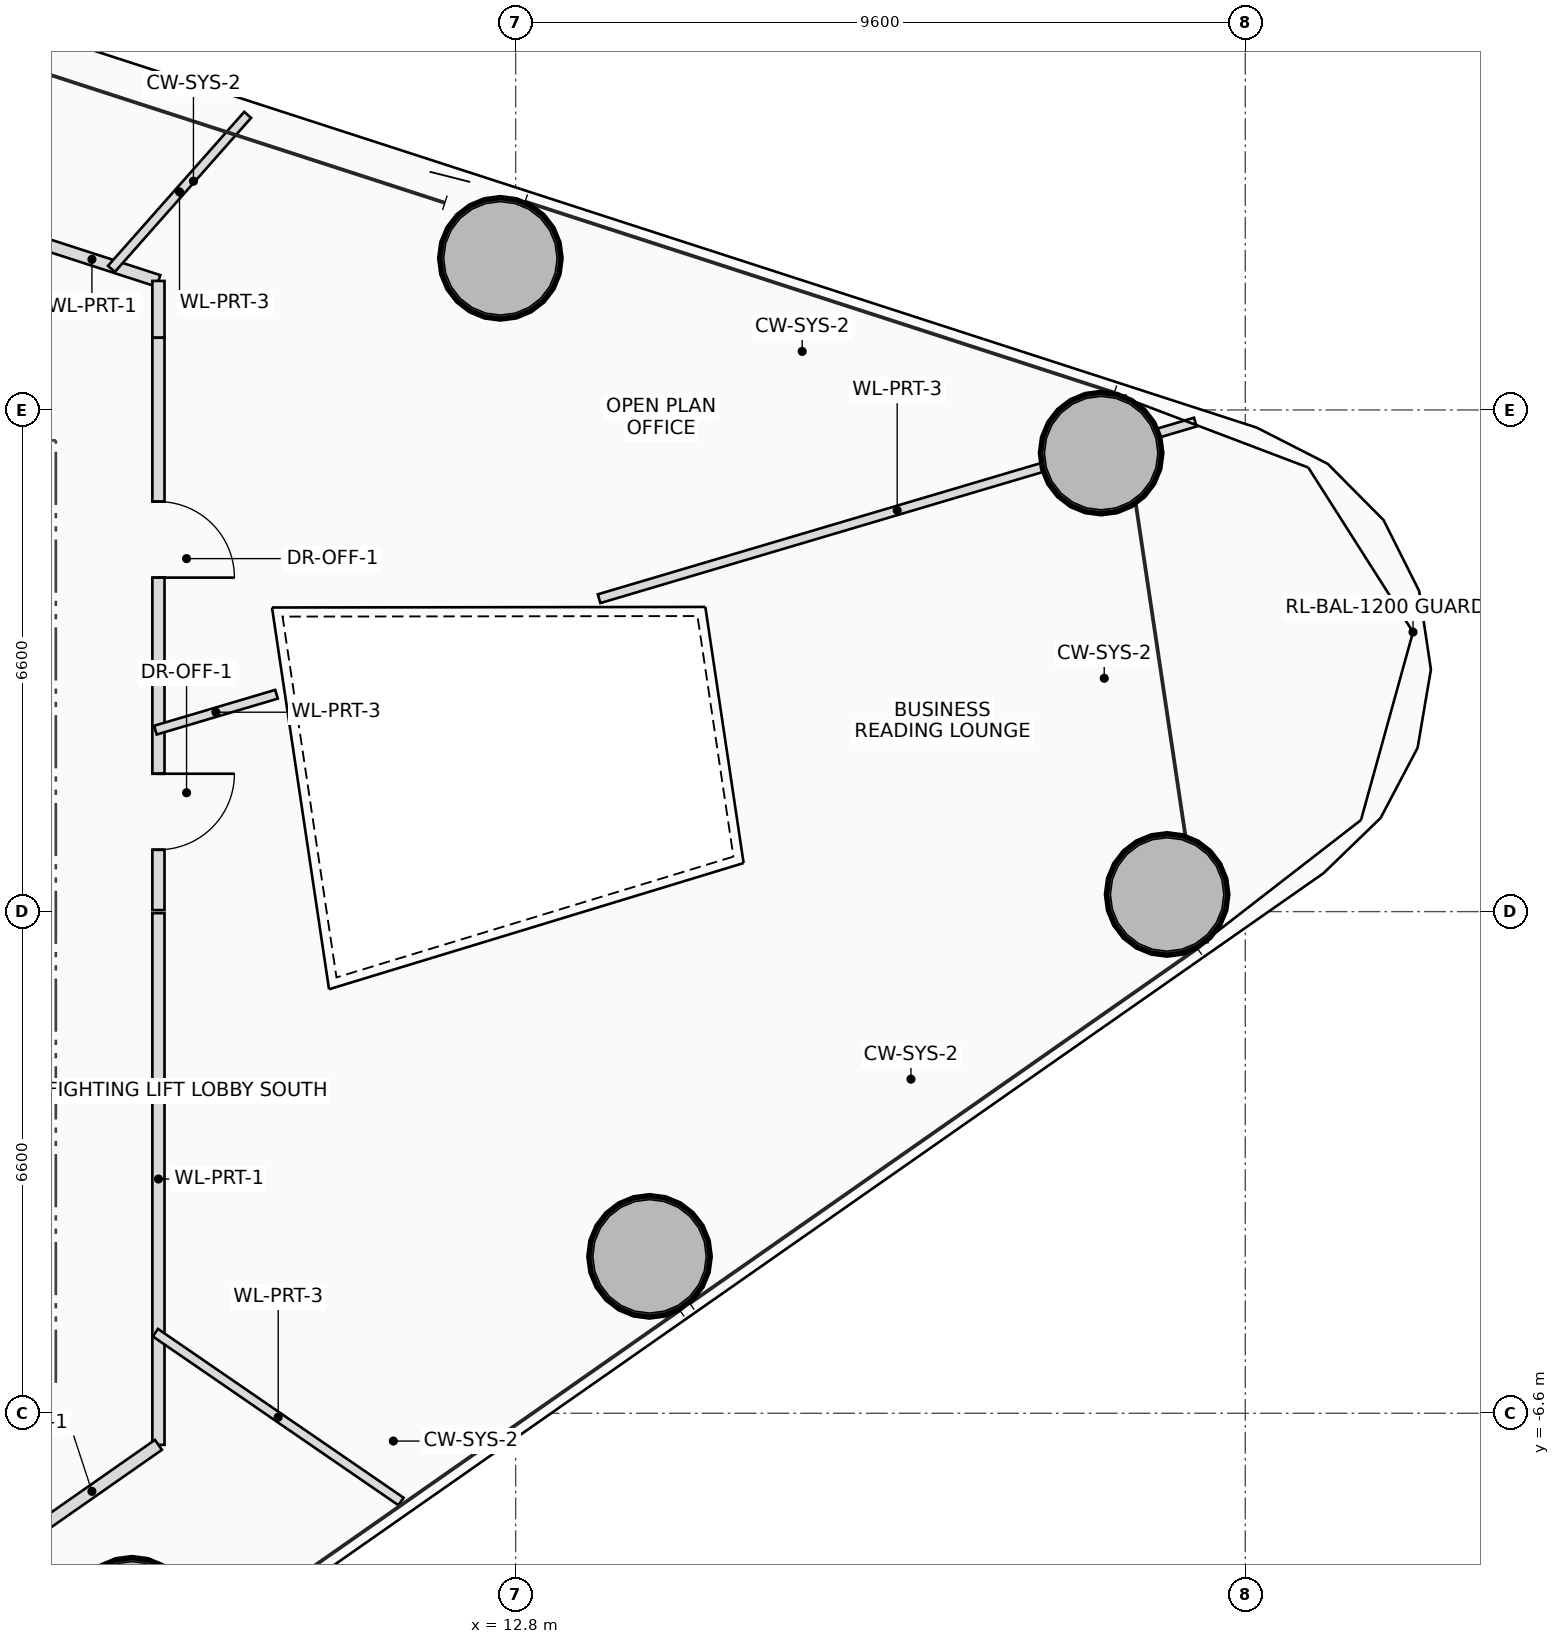
"""IFC4 building model, lengths in metres.
Left out: names, types, materials, properties, quantities, classifications, styles, units other than length and angle.
Written with IfcOpenShell. Run it as: python <this file> out.ifc"""

import sys

from ifc_helpers import new_model, si_unit, direction, frame, frame_2d, origin, origin_2d, place, context, subcontext, project, spatial, rectangle, hollow_circle, extrude, source, transform, mapped, element, fill, save


model = new_model("IFC4")
c1 = context("Model", 3, precision=1e-05, world=origin(), true_north=direction((0.0, 1.0)))
c2 = subcontext(c1, "Body", "Model", "MODEL_VIEW")
j1 = project(units=[si_unit("LENGTHUNIT", "METRE"), si_unit("PLANEANGLEUNIT", "RADIAN")], contexts=[c1])
p1 = place(None, origin())
s1 = spatial("IfcSite", under=j1, at=p1, CompositionType="ELEMENT")
p2 = place(p1, origin())
s2 = spatial("IfcBuilding", under=s1, at=p2, CompositionType="ELEMENT")
p3 = place(p2, frame((0.0, 0.0, 73.55)))
s3 = spatial("IfcBuildingStorey", under=s2, at=p3, CompositionType="ELEMENT", Elevation=73.55)
m1 = source(origin(), c2, "Body", "SweptSolid", [
    extrude(hollow_circle(Radius=0.8, WallThickness=0.055, at=origin_2d()), origin(), (0.0, 0.0, 1.0), 3.75),
])
for number, where, z_axis, x_axis in (
    (1, (7.752, -9.297, 0.0), (0.0, 0.0, 1.0), (1.0, 0.0, 0.0)),
    (2, (14.562, -4.535, 0.0), (0.0, 0.0, 1.0), (1.0, 0.0, 0.0)),
    (3, (21.371, 0.226, 0.0), (0.0, 0.0, 1.0), (1.0, 0.0, 0.0)),
    (4, (20.503, 6.032, 0.0), (0.0, 0.0, 1.0), (1.0, 0.0, 0.0)),
    (5, (12.599, 8.594, 0.0), (0.0, 0.0, 1.0), (1.0, 0.0, 0.0)),
):
    element("IfcColumn", number, at=place(p3, frame(where, z_axis=z_axis, x_axis=x_axis)), inside=s3, PredefinedType="COLUMN", context=c2, shape_type="MappedRepresentation", body=[
        mapped(m1, transform((0.0, 0.0, 0.0), scale=1.0)),
    ])
p4 = place(p3, frame((6.35, 8.865, 0.0), z_axis=(0.0, 0.0, 1.0), x_axis=(0.951291213681, -0.308293734568, 0.0)))
e6 = element("IfcWall", 6, at=p4, inside=s3, PredefinedType="PARTITIONING", context=c2, shape_type="SweptSolid", body=[
    extrude(rectangle(XDim=1.84, YDim=0.16, at=frame_2d((0.92, 0.0))), origin(), (0.0, 0.0, 1.0), 3.2),
])
p5 = place(p3, frame((8.1, 8.298, 0.0), z_axis=(0.0, 0.0, 1.0), x_axis=(0.0, -1.0, 0.0)))
e7 = element("IfcWall", 7, at=p5, inside=s3, PredefinedType="PARTITIONING", context=c2, shape_type="SweptSolid", body=[
    extrude(rectangle(XDim=0.748, YDim=0.16, at=frame_2d((0.374, 0.0))), origin(), (0.0, 0.0, 1.0), 3.545),
])
p6 = place(p3, frame((8.1, 7.55, 0.0), z_axis=(0.0, 0.0, 1.0), x_axis=(0.0, -1.0, 0.0)))
e8 = element("IfcWall", 8, at=p6, inside=s3, PredefinedType="PARTITIONING", context=c2, shape_type="SweptSolid", body=[
    extrude(rectangle(XDim=7.53, YDim=0.16, at=frame_2d((3.765, 0.0))), origin(), (0.0, 0.0, 1.0), 2.85),
])
p7 = place(p6, frame((2.156, 0.0, 0.0)))
e9 = element("IfcOpeningElement", 9, at=p7, cuts=e8, PredefinedType="OPENING", context=c2, shape_type="SweptSolid", body=[
    extrude(rectangle(XDim=1.0, YDim=2.25, at=frame_2d((0.5, 1.125))), frame((0.0, 0.09, 0.0), z_axis=(0.0, -1.0, 0.0), x_axis=(1.0, 0.0, 0.0)), (0.0, 0.0, 1.0), 0.18),
])
p8 = place(p6, frame((5.736, 0.0, 0.0)))
e10 = element("IfcOpeningElement", 10, at=p8, cuts=e8, PredefinedType="OPENING", context=c2, shape_type="SweptSolid", body=[
    extrude(rectangle(XDim=1.0, YDim=2.25, at=frame_2d((0.5, 1.125))), frame((0.0, 0.09, 0.0), z_axis=(0.0, -1.0, 0.0), x_axis=(1.0, 0.0, 0.0)), (0.0, 0.0, 1.0), 0.18),
])
p9 = place(p3, frame((8.1, -0.02, 0.0), z_axis=(0.0, 0.0, 1.0), x_axis=(0.0, -1.0, 0.0)))
e11 = element("IfcWall", 11, at=p9, inside=s3, PredefinedType="PARTITIONING", context=c2, shape_type="SweptSolid", body=[
    extrude(rectangle(XDim=6.995, YDim=0.16, at=frame_2d((3.498, 0.0))), origin(), (0.0, 0.0, 1.0), 2.85),
])
p10 = place(p3, frame((8.1, -7.015, 0.0), z_axis=(0.0, 0.0, 1.0), x_axis=(-0.81953260104, -0.573032560883, 0.0)))
e12 = element("IfcWall", 12, at=p10, inside=s3, PredefinedType="PARTITIONING", context=c2, shape_type="SweptSolid", body=[
    extrude(rectangle(XDim=2.135, YDim=0.16, at=frame_2d((1.068, 0.0))), origin(), (0.0, 0.0, 1.0), 2.85),
])
p11 = place(p3, frame((8.06, -5.54, 0.0), z_axis=(0.0, 0.0, 1.0), x_axis=(0.824103676806, -0.566438990426, 0.0)))
e13 = element("IfcWall", 13, at=p11, inside=s3, PredefinedType="PARTITIONING", context=c2, shape_type="SweptSolid", body=[
    extrude(rectangle(XDim=3.922, YDim=0.12, at=frame_2d((1.961, 0.0))), origin(), (0.0, 0.0, 1.0), 3.01),
])
p12 = place(p3, frame((8.06, 2.387, 0.0), z_axis=(0.0, 0.0, 1.0), x_axis=(0.958783289971, 0.28413835164, 0.0)))
e14 = element("IfcWall", 14, at=p12, inside=s3, PredefinedType="PARTITIONING", context=c2, shape_type="SweptSolid", body=[
    extrude(rectangle(XDim=1.662, YDim=0.12, at=frame_2d((0.831, 0.0))), origin(), (0.0, 0.0, 1.0), 3.21),
])
p13 = place(p3, frame((13.897, 4.117, 0.0), z_axis=(0.0, 0.0, 1.0), x_axis=(0.958827308203, 0.283989776303, 0.0)))
e15 = element("IfcWall", 15, at=p13, inside=s3, PredefinedType="PARTITIONING", context=c2, shape_type="SweptSolid", body=[
    extrude(rectangle(XDim=8.182, YDim=0.12, at=frame_2d((4.091, 0.0))), origin(), (0.0, 0.0, 1.0), 2.85),
])
p14 = place(p3, frame((7.481, 8.456, 0.0), z_axis=(0.0, 0.0, 1.0), x_axis=(0.662647880096, 0.7489310963, 0.0)))
e16 = element("IfcWall", 16, at=p14, inside=s3, PredefinedType="PARTITIONING", context=c2, shape_type="SweptSolid", body=[
    extrude(rectangle(XDim=2.705, YDim=0.12, at=frame_2d((1.353, 0.0))), origin(), (0.0, 0.0, 1.0), 3.01),
])
p15 = place(p7, origin())
e17 = element("IfcDoor", 17, at=p15, inside=s3, OperationType="SINGLE_SWING_RIGHT", PredefinedType="DOOR", context=c2, shape_type="SweptSolid", body=[
    extrude(rectangle(XDim=1.0, YDim=2.25, at=frame_2d((0.5, 1.125))), frame((0.0, 0.025, 0.0), z_axis=(0.0, -1.0, 0.0), x_axis=(1.0, 0.0, 0.0)), (0.0, 0.0, 1.0), 0.05),
])
fill(e9, e17)
p16 = place(p8, origin())
e18 = element("IfcDoor", 18, at=p16, inside=s3, OperationType="SINGLE_SWING_LEFT", PredefinedType="DOOR", context=c2, shape_type="SweptSolid", body=[
    extrude(rectangle(XDim=1.0, YDim=2.25, at=frame_2d((0.5, 1.125))), frame((0.0, 0.025, 0.0), z_axis=(0.0, -1.0, 0.0), x_axis=(1.0, 0.0, 0.0)), (0.0, 0.0, 1.0), 0.05),
])
fill(e10, e18)
save(model, sys.argv[1])
